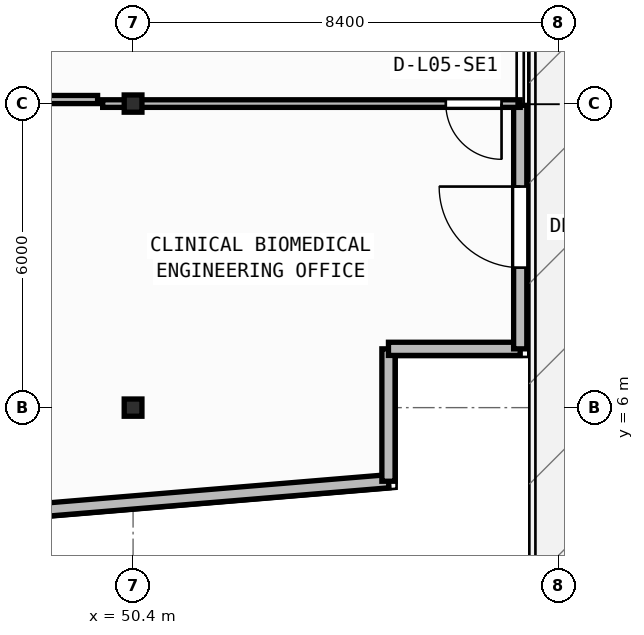
"""IFC4 building model, lengths in metres.
Left out: names, types, materials, properties, quantities, classifications, styles, units other than length and angle.
Written with IfcOpenShell. Run it as: python <this file> out.ifc"""

import sys

from ifc_helpers import new_model, si_unit, direction, frame, frame_2d, origin, origin_2d, place, context, subcontext, project, spatial, rectangle, i_section, extrude, element, fill, save


model = new_model("IFC4")
c1 = context("Model", 3, precision=1e-05, world=origin(), true_north=direction((0.0, 1.0)))
c2 = subcontext(c1, "Body", "Model", "MODEL_VIEW")
j1 = project(units=[si_unit("LENGTHUNIT", "METRE"), si_unit("PLANEANGLEUNIT", "RADIAN")], contexts=[c1])
p1 = place(None, origin())
s1 = spatial("IfcSite", under=j1, at=p1, CompositionType="ELEMENT")
p2 = place(p1, origin())
s2 = spatial("IfcBuilding", under=s1, at=p2, CompositionType="ELEMENT")
p3 = place(p2, frame((0.0, 0.0, 22.5)))
s3 = spatial("IfcBuildingStorey", under=s2, at=p3, CompositionType="ELEMENT", Elevation=22.5)
for number, where, z_axis, x_axis in (
    (1, (50.4, 6.0, 0.0), (0.0, 0.0, 1.0), (1.0, 0.0, 0.0)),
    (2, (50.4, 12.0, 0.0), (0.0, 0.0, 1.0), (1.0, 0.0, 0.0)),
):
    element("IfcColumn", number, at=place(p3, frame(where, z_axis=z_axis, x_axis=x_axis)), inside=s3, PredefinedType="COLUMN", context=c2, shape_type="SweptSolid", body=[
        extrude(i_section(OverallWidth=0.35, OverallDepth=0.34, WebThickness=0.016, FlangeThickness=0.028, at=origin_2d()), origin(), (0.0, 0.0, 1.0), 3.95),
    ])
p4 = place(p3, frame((2.76, 0.174, 0.0), z_axis=(0.0, 0.0, 1.0), x_axis=(0.996571478456, 0.082736257641, 0.0)))
e3 = element("IfcWall", 3, at=p4, inside=s3, PredefinedType="STANDARD", context=c2, shape_type="SweptSolid", body=[
    extrude(rectangle(XDim=52.861, YDim=0.26, at=frame_2d((26.431, 0.0))), origin(), (0.0, 0.0, 1.0), 3.71),
])
p5 = place(p4, frame((25.231, 0.0, 0.9)))
e4 = element("IfcOpeningElement", 4, at=p5, cuts=e3, PredefinedType="OPENING", context=c2, shape_type="SweptSolid", body=[
    extrude(rectangle(XDim=2.4, YDim=1.65, at=frame_2d((1.2, 0.825))), frame((0.0, 0.14, 0.0), z_axis=(0.0, -1.0, 0.0), x_axis=(1.0, 0.0, 0.0)), (0.0, 0.0, 1.0), 0.28),
])
p6 = place(p3, frame((55.44, 4.547, 0.0), z_axis=(0.0, 0.0, 1.0), x_axis=(0.0, 1.0, 0.0)))
e5 = element("IfcWall", 5, at=p6, inside=s3, PredefinedType="STANDARD", context=c2, shape_type="SweptSolid", body=[
    extrude(rectangle(XDim=2.613, YDim=0.26, at=frame_2d((1.306, 0.0))), origin(), (0.0, 0.0, 1.0), 3.71),
])
p7 = place(p3, frame((55.44, 7.16, 0.0), z_axis=(0.0, 0.0, 1.0), x_axis=(1.0, 0.0, 0.0)))
e6 = element("IfcWall", 6, at=p7, inside=s3, PredefinedType="STANDARD", context=c2, shape_type="SweptSolid", body=[
    extrude(rectangle(XDim=2.6, YDim=0.26, at=frame_2d((1.3, 0.0))), origin(), (0.0, 0.0, 1.0), 3.71),
])
p8 = place(p3, frame((58.04, 7.16, 0.0), z_axis=(0.0, 0.0, 1.0), x_axis=(0.0, 1.0, 0.0)))
e7 = element("IfcWall", 7, at=p8, inside=s3, PredefinedType="STANDARD", context=c2, shape_type="SweptSolid", body=[
    extrude(rectangle(XDim=4.805, YDim=0.26, at=frame_2d((2.403, 0.0))), origin(), (0.0, 0.0, 1.0), 3.71),
])
p9 = place(p8, frame((1.603, 0.0, 0.0)))
e8 = element("IfcOpeningElement", 8, at=p9, cuts=e7, PredefinedType="OPENING", context=c2, shape_type="SweptSolid", body=[
    extrude(rectangle(XDim=1.6, YDim=2.2, at=frame_2d((0.8, 1.1))), frame((0.0, 0.14, 0.0), z_axis=(0.0, -1.0, 0.0), x_axis=(1.0, 0.0, 0.0)), (0.0, 0.0, 1.0), 0.28),
])
p10 = place(p3, frame((58.04, 12.0, 0.0), z_axis=(0.0, 0.0, 1.0), x_axis=(-1.0, 0.0, 0.0)))
e9 = element("IfcWall", 9, at=p10, inside=s3, PredefinedType="PARTITIONING", context=c2, shape_type="SweptSolid", body=[
    extrude(rectangle(XDim=8.24, YDim=0.15, at=frame_2d((4.12, 0.0))), origin(), (0.0, 0.0, 1.0), 3.073),
])
p11 = place(p10, frame((0.368, 0.0, 0.0)))
e10 = element("IfcOpeningElement", 10, at=p11, cuts=e9, PredefinedType="OPENING", context=c2, shape_type="SweptSolid", body=[
    extrude(rectangle(XDim=1.1, YDim=2.1, at=frame_2d((0.55, 1.05))), frame((0.0, 0.085, 0.0), z_axis=(0.0, -1.0, 0.0), x_axis=(1.0, 0.0, 0.0)), (0.0, 0.0, 1.0), 0.17),
])
p12 = place(p3, frame((46.689, 12.08, 0.0), z_axis=(0.0, 0.0, 1.0), x_axis=(1.0, 0.0, 0.0)))
e11 = element("IfcWall", 11, at=p12, inside=s3, PredefinedType="PARTITIONING", context=c2, shape_type="SweptSolid", body=[
    extrude(rectangle(XDim=3.011, YDim=0.16, at=frame_2d((1.505, 0.0))), origin(), (0.0, 0.0, 1.0), 3.073),
])
p13 = place(p9, origin())
e12 = element("IfcDoor", 12, at=p13, inside=s3, OperationType="SINGLE_SWING_RIGHT", PredefinedType="DOOR", context=c2, shape_type="SweptSolid", body=[
    extrude(rectangle(XDim=1.6, YDim=2.2, at=frame_2d((0.8, 1.1))), frame((0.0, 0.025, 0.0), z_axis=(0.0, -1.0, 0.0), x_axis=(1.0, 0.0, 0.0)), (0.0, 0.0, 1.0), 0.05),
])
fill(e8, e12)
p14 = place(p11, origin())
e13 = element("IfcDoor", 13, at=p14, inside=s3, OperationType="SINGLE_SWING_LEFT", PredefinedType="DOOR", context=c2, shape_type="SweptSolid", body=[
    extrude(rectangle(XDim=1.1, YDim=2.1, at=frame_2d((0.55, 1.05))), frame((0.0, 0.025, 0.0), z_axis=(0.0, -1.0, 0.0), x_axis=(1.0, 0.0, 0.0)), (0.0, 0.0, 1.0), 0.05),
])
fill(e10, e13)
save(model, sys.argv[1])
